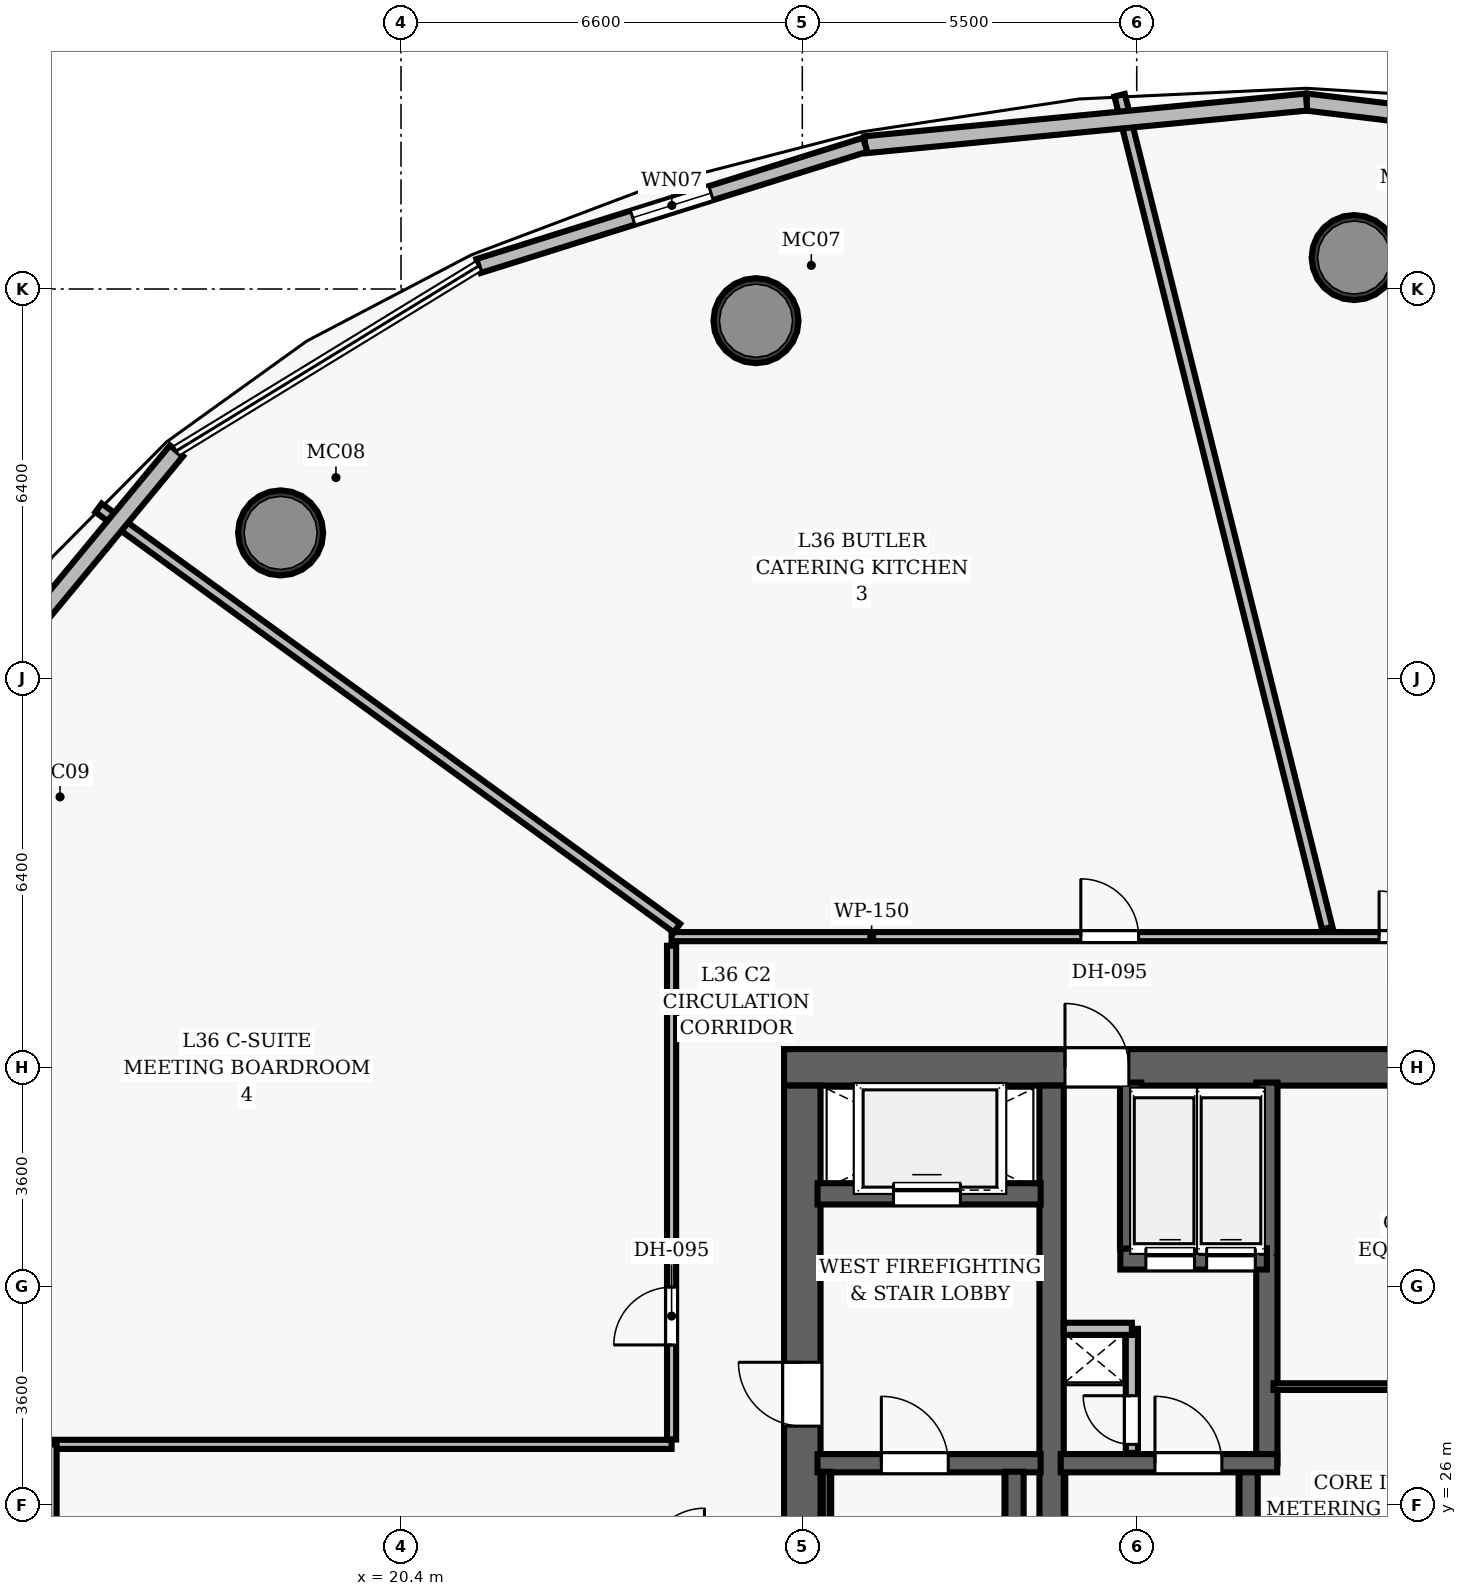
"""IFC4 building model, lengths in metres.
Left out: names, types, materials, properties, quantities, classifications, styles, units other than length and angle.
Written with IfcOpenShell. Run it as: python <this file> out.ifc"""

import sys

from ifc_helpers import new_model, si_unit, direction, frame, frame_2d, origin, origin_2d, place, context, subcontext, project, spatial, rectangle, hollow_circle, extrude, element, fill, save


model = new_model("IFC4")
c1 = context("Model", 3, precision=1e-05, world=origin(), true_north=direction((0.0, 1.0)))
c2 = subcontext(c1, "Body", "Model", "MODEL_VIEW")
j1 = project(units=[si_unit("LENGTHUNIT", "METRE"), si_unit("PLANEANGLEUNIT", "RADIAN")], contexts=[c1])
p1 = place(None, origin())
s1 = spatial("IfcSite", under=j1, at=p1, CompositionType="ELEMENT")
p2 = place(p1, origin())
s2 = spatial("IfcBuilding", under=s1, at=p2, CompositionType="ELEMENT")
p3 = place(p2, frame((0.0, 0.0, 144.8)))
s3 = spatial("IfcBuildingStorey", under=s2, at=p3, CompositionType="ELEMENT", Elevation=144.8)
p4 = place(p3, frame((26.7, 33.2, 0.0), z_axis=(0.0, 0.0, 1.0), x_axis=(1.0, 0.0, 0.0)))
e1 = element("IfcWall", 1, at=p4, inside=s3, PredefinedType="SHEAR", context=c2, shape_type="SweptSolid", body=[
    extrude(rectangle(XDim=22.6, YDim=0.6, at=frame_2d((11.3, 0.0))), origin(), (0.0, 0.0, 1.0), 3.5),
])
p5 = place(p4, frame((4.62, 0.0, 0.0)))
e2 = element("IfcOpeningElement", 2, at=p5, cuts=e1, PredefinedType="OPENING", context=c2, shape_type="SweptSolid", body=[
    extrude(rectangle(XDim=1.05, YDim=2.15, at=frame_2d((0.525, 1.075))), frame((0.0, 0.31, 0.0), z_axis=(0.0, -1.0, 0.0), x_axis=(1.0, 0.0, 0.0)), (0.0, 0.0, 1.0), 0.62),
])
p6 = place(p4, frame((14.52, 0.0, 0.0)))
e3 = element("IfcOpeningElement", 3, at=p6, cuts=e1, PredefinedType="OPENING", context=c2, shape_type="SweptSolid", body=[
    extrude(rectangle(XDim=1.05, YDim=2.15, at=frame_2d((0.525, 1.075))), frame((0.0, 0.31, 0.0), z_axis=(0.0, -1.0, 0.0), x_axis=(1.0, 0.0, 0.0)), (0.0, 0.0, 1.0), 0.62),
])
p7 = place(p3, frame((27.0, 19.1, 0.0), z_axis=(0.0, 0.0, 1.0), x_axis=(0.0, 1.0, 0.0)))
e4 = element("IfcWall", 4, at=p7, inside=s3, PredefinedType="SHEAR", context=c2, shape_type="SweptSolid", body=[
    extrude(rectangle(XDim=13.8, YDim=0.6, at=frame_2d((6.9, 0.0))), origin(), (0.0, 0.0, 1.0), 3.5),
])
p8 = place(p7, frame((8.2, 0.0, 0.0)))
e5 = element("IfcOpeningElement", 5, at=p8, cuts=e4, PredefinedType="OPENING", context=c2, shape_type="SweptSolid", body=[
    extrude(rectangle(XDim=1.05, YDim=2.15, at=frame_2d((0.525, 1.075))), frame((0.0, 0.31, 0.0), z_axis=(0.0, -1.0, 0.0), x_axis=(1.0, 0.0, 0.0)), (0.0, 0.0, 1.0), 0.62),
])
p9 = place(p3, frame((31.1, 19.1, 0.0), z_axis=(0.0, 0.0, 1.0), x_axis=(0.0, 1.0, 0.0)))
e6 = element("IfcWall", 6, at=p9, inside=s3, PredefinedType="SHEAR", context=c2, shape_type="SweptSolid", body=[
    extrude(rectangle(XDim=13.8, YDim=0.4, at=frame_2d((6.9, 0.0))), origin(), (0.0, 0.0, 1.0), 3.5),
])
for number, where, z_axis, x_axis in (
    (7, (36.076, 46.517, 0.0), (0.0, 0.0, 1.0), (1.0, 0.0, 0.0)),
    (8, (26.238, 45.479, 0.0), (0.0, 0.0, 1.0), (1.0, 0.0, 0.0)),
    (9, (18.42, 41.989, 0.0), (0.0, 0.0, 1.0), (1.0, 0.0, 0.0)),
):
    element("IfcColumn", number, at=place(p3, frame(where, z_axis=z_axis, x_axis=x_axis)), inside=s3, PredefinedType="COLUMN", context=c2, shape_type="SweptSolid", body=[
        extrude(hollow_circle(Radius=0.7, WallThickness=0.055, at=origin_2d()), origin(), (0.0, 0.0, 1.0), 3.5),
    ])
p10 = place(p3, frame((27.25, 26.69, 0.0), z_axis=(0.0, 0.0, 1.0), x_axis=(1.0, 0.0, 0.0)))
e10 = element("IfcWall", 10, at=p10, inside=s3, PredefinedType="SHEAR", context=c2, shape_type="SweptSolid", body=[
    extrude(rectangle(XDim=3.67, YDim=0.3, at=frame_2d((1.835, 0.0))), origin(), (0.0, 0.0, 1.0), 3.5),
])
p11 = place(p10, frame((1.05, 0.0, 0.0)))
e11 = element("IfcOpeningElement", 11, at=p11, cuts=e10, PredefinedType="OPENING", context=c2, shape_type="SweptSolid", body=[
    extrude(rectangle(XDim=1.1, YDim=2.15, at=frame_2d((0.55, 1.075))), frame((0.0, 0.16, 0.0), z_axis=(0.0, -1.0, 0.0), x_axis=(1.0, 0.0, 0.0)), (0.0, 0.0, 1.0), 0.32),
])
p12 = place(p3, frame((30.49, 19.05, 0.0), z_axis=(0.0, 0.0, 1.0), x_axis=(0.0, 1.0, 0.0)))
e12 = element("IfcWall", 12, at=p12, inside=s3, PredefinedType="SHEAR", context=c2, shape_type="SweptSolid", body=[
    extrude(rectangle(XDim=7.5, YDim=0.3, at=frame_2d((3.75, 0.0))), origin(), (0.0, 0.0, 1.0), 3.5),
])
p13 = place(p3, frame((27.395, 19.1, 0.0), z_axis=(0.0, 0.0, 1.0), x_axis=(0.0, 1.0, 0.0)))
e13 = element("IfcWall", 13, at=p13, inside=s3, PredefinedType="SHEAR", context=c2, shape_type="SweptSolid", body=[
    extrude(rectangle(XDim=7.45, YDim=0.12, at=frame_2d((3.725, 0.0))), origin(), (0.0, 0.0, 1.0), 3.5),
])
p14 = place(p3, frame((27.25, 31.12, 0.0), z_axis=(0.0, 0.0, 1.0), x_axis=(1.0, 0.0, 0.0)))
e14 = element("IfcWall", 14, at=p14, inside=s3, PredefinedType="SHEAR", context=c2, shape_type="SweptSolid", body=[
    extrude(rectangle(XDim=3.67, YDim=0.35, at=frame_2d((1.835, 0.0))), origin(), (0.0, 0.0, 1.0), 2.675),
])
p15 = place(p14, frame((1.25, 0.0, 0.0)))
e15 = element("IfcOpeningElement", 15, at=p15, cuts=e14, PredefinedType="OPENING", context=c2, shape_type="SweptSolid", body=[
    extrude(rectangle(XDim=1.1, YDim=2.15, at=frame_2d((0.55, 1.075))), frame((0.0, 0.185, 0.0), z_axis=(0.0, -1.0, 0.0), x_axis=(1.0, 0.0, 0.0)), (0.0, 0.0, 1.0), 0.37),
])
p16 = place(p3, frame((34.34, 19.05, 0.0), z_axis=(0.0, 0.0, 1.0), x_axis=(0.0, 1.0, 0.0)))
e16 = element("IfcWall", 16, at=p16, inside=s3, PredefinedType="SHEAR", context=c2, shape_type="SweptSolid", body=[
    extrude(rectangle(XDim=7.5, YDim=0.3, at=frame_2d((3.75, 0.0))), origin(), (0.0, 0.0, 1.0), 3.5),
])
p17 = place(p3, frame((34.64, 26.69, 0.0), z_axis=(0.0, 0.0, 1.0), x_axis=(0.0, 1.0, 0.0)))
e17 = element("IfcWall", 17, at=p17, inside=s3, PredefinedType="SHEAR", context=c2, shape_type="SweptSolid", body=[
    extrude(rectangle(XDim=6.26, YDim=0.35, at=frame_2d((3.13, 0.0))), origin(), (0.0, 0.0, 1.0), 3.5),
])
p18 = place(p3, frame((31.25, 26.69, 0.0), z_axis=(0.0, 0.0, 1.0), x_axis=(1.0, 0.0, 0.0)))
e18 = element("IfcWall", 18, at=p18, inside=s3, PredefinedType="SHEAR", context=c2, shape_type="SweptSolid", body=[
    extrude(rectangle(XDim=3.56, YDim=0.3, at=frame_2d((1.78, 0.0))), origin(), (0.0, 0.0, 1.0), 3.5),
])
p19 = place(p18, frame((1.55, 0.0, 0.0)))
e19 = element("IfcOpeningElement", 19, at=p19, cuts=e18, PredefinedType="OPENING", context=c2, shape_type="SweptSolid", body=[
    extrude(rectangle(XDim=1.1, YDim=2.15, at=frame_2d((0.55, 1.075))), frame((0.0, 0.16, 0.0), z_axis=(0.0, -1.0, 0.0), x_axis=(1.0, 0.0, 0.0)), (0.0, 0.0, 1.0), 0.32),
])
p20 = place(p3, frame((32.23, 30.05, 0.0), z_axis=(0.0, 0.0, 1.0), x_axis=(1.0, 0.0, 0.0)))
e20 = element("IfcWall", 20, at=p20, inside=s3, PredefinedType="SHEAR", context=c2, shape_type="SweptSolid", body=[
    extrude(rectangle(XDim=2.41, YDim=0.35, at=frame_2d((1.205, 0.0))), origin(), (0.0, 0.0, 1.0), 2.675),
])
p21 = place(p20, frame((0.42, 0.0, 0.0)))
e21 = element("IfcOpeningElement", 21, at=p21, cuts=e20, PredefinedType="OPENING", context=c2, shape_type="SweptSolid", body=[
    extrude(rectangle(XDim=0.8, YDim=2.15, at=frame_2d((0.4, 1.075))), frame((0.0, 0.185, 0.0), z_axis=(0.0, -1.0, 0.0), x_axis=(1.0, 0.0, 0.0)), (0.0, 0.0, 1.0), 0.37),
])
p22 = place(p20, frame((1.42, 0.0, 0.0)))
e22 = element("IfcOpeningElement", 22, at=p22, cuts=e20, PredefinedType="OPENING", context=c2, shape_type="SweptSolid", body=[
    extrude(rectangle(XDim=0.8, YDim=2.15, at=frame_2d((0.4, 1.075))), frame((0.0, 0.185, 0.0), z_axis=(0.0, -1.0, 0.0), x_axis=(1.0, 0.0, 0.0)), (0.0, 0.0, 1.0), 0.37),
])
p23 = place(p3, frame((32.4, 30.22, 0.0), z_axis=(0.0, 0.0, 1.0), x_axis=(0.0, 1.0, 0.0)))
e23 = element("IfcWall", 23, at=p23, inside=s3, PredefinedType="SHEAR", context=c2, shape_type="SweptSolid", body=[
    extrude(rectangle(XDim=2.73, YDim=0.35, at=frame_2d((1.365, 0.0))), origin(), (0.0, 0.0, 1.0), 2.675),
])
p24 = place(p3, frame((32.42, 26.86, 0.0), z_axis=(0.0, 0.0, 1.0), x_axis=(0.0, 1.0, 0.0)))
e24 = element("IfcWall", 24, at=p24, inside=s3, PredefinedType="PARTITIONING", context=c2, shape_type="SweptSolid", body=[
    extrude(rectangle(XDim=2.04, YDim=0.2, at=frame_2d((1.02, 0.0))), origin(), (0.0, 0.0, 1.0), 2.675),
])
p25 = place(p24, frame((0.14, 0.0, 0.0)))
e25 = element("IfcOpeningElement", 25, at=p25, cuts=e24, PredefinedType="OPENING", context=c2, shape_type="SweptSolid", body=[
    extrude(rectangle(XDim=0.8, YDim=2.05, at=frame_2d((0.4, 1.025))), frame((0.0, 0.11, 0.0), z_axis=(0.0, -1.0, 0.0), x_axis=(1.0, 0.0, 0.0)), (0.0, 0.0, 1.0), 0.22),
])
p26 = place(p3, frame((31.3, 28.9, 0.0), z_axis=(0.0, 0.0, 1.0), x_axis=(1.0, 0.0, 0.0)))
e26 = element("IfcWall", 26, at=p26, inside=s3, PredefinedType="PARTITIONING", context=c2, shape_type="SweptSolid", body=[
    extrude(rectangle(XDim=1.12, YDim=0.2, at=frame_2d((0.56, 0.0))), origin(), (0.0, 0.0, 1.0), 2.675),
])
p27 = place(p3, frame((34.75, 27.95, 0.0), z_axis=(0.0, 0.0, 1.0), x_axis=(1.0, 0.0, 0.0)))
e27 = element("IfcWall", 27, at=p27, inside=s3, PredefinedType="PARTITIONING", context=c2, shape_type="SweptSolid", body=[
    extrude(rectangle(XDim=6.25, YDim=0.11, at=frame_2d((3.125, 0.0))), origin(), (0.0, 0.0, 1.0), 2.675),
])
p28 = place(p3, frame((24.85, 35.35, 0.0), z_axis=(0.0, 0.0, 1.0), x_axis=(1.0, 0.0, 0.0)))
e28 = element("IfcWall", 28, at=p28, inside=s3, PredefinedType="PARTITIONING", context=c2, shape_type="SweptSolid", body=[
    extrude(rectangle(XDim=26.0, YDim=0.15, at=frame_2d((13.0, 0.0))), origin(), (0.0, 0.0, 1.0), 2.675),
])
p29 = place(p28, frame((18.854, 0.0, 0.0)))
e29 = element("IfcOpeningElement", 29, at=p29, cuts=e28, PredefinedType="OPENING", context=c2, shape_type="SweptSolid", body=[
    extrude(rectangle(XDim=1.5, YDim=2.2, at=frame_2d((0.75, 1.1))), frame((0.0, 0.085, 0.0), z_axis=(0.0, -1.0, 0.0), x_axis=(1.0, 0.0, 0.0)), (0.0, 0.0, 1.0), 0.17),
])
p30 = place(p28, frame((11.636, 0.0, 0.0)))
e30 = element("IfcOpeningElement", 30, at=p30, cuts=e28, PredefinedType="OPENING", context=c2, shape_type="SweptSolid", body=[
    extrude(rectangle(XDim=1.5, YDim=2.2, at=frame_2d((0.75, 1.1))), frame((0.0, 0.085, 0.0), z_axis=(0.0, -1.0, 0.0), x_axis=(1.0, 0.0, 0.0)), (0.0, 0.0, 1.0), 0.17),
])
p31 = place(p28, frame((6.73, 0.0, 0.0)))
e31 = element("IfcOpeningElement", 31, at=p31, cuts=e28, PredefinedType="OPENING", context=c2, shape_type="SweptSolid", body=[
    extrude(rectangle(XDim=0.95, YDim=2.15, at=frame_2d((0.475, 1.075))), frame((0.0, 0.085, 0.0), z_axis=(0.0, -1.0, 0.0), x_axis=(1.0, 0.0, 0.0)), (0.0, 0.0, 1.0), 0.17),
])
p32 = place(p3, frame((24.85, 27.08, 0.0), z_axis=(0.0, 0.0, 1.0), x_axis=(0.0, 1.0, 0.0)))
e32 = element("IfcWall", 32, at=p32, inside=s3, PredefinedType="PARTITIONING", context=c2, shape_type="SweptSolid", body=[
    extrude(rectangle(XDim=8.12, YDim=0.15, at=frame_2d((4.06, 0.0))), origin(), (0.0, 0.0, 1.0), 2.675),
])
p33 = place(p32, frame((1.555, 0.0, 0.0)))
e33 = element("IfcOpeningElement", 33, at=p33, cuts=e32, PredefinedType="OPENING", context=c2, shape_type="SweptSolid", body=[
    extrude(rectangle(XDim=0.95, YDim=2.15, at=frame_2d((0.475, 1.075))), frame((0.0, 0.085, 0.0), z_axis=(0.0, -1.0, 0.0), x_axis=(1.0, 0.0, 0.0)), (0.0, 0.0, 1.0), 0.17),
])
p34 = place(p3, frame((14.661, 27.0, 0.0), z_axis=(0.0, 0.0, 1.0), x_axis=(1.0, 0.0, 0.0)))
e34 = element("IfcWall", 34, at=p34, inside=s3, PredefinedType="PARTITIONING", context=c2, shape_type="SweptSolid", body=[
    extrude(rectangle(XDim=10.189, YDim=0.15, at=frame_2d((5.094, 0.0))), origin(), (0.0, 0.0, 1.0), 2.675),
])
p35 = place(p3, frame((14.661, 25.0, 0.0), z_axis=(0.0, 0.0, 1.0), x_axis=(0.0, 1.0, 0.0)))
e35 = element("IfcWall", 35, at=p35, inside=s3, PredefinedType="PARTITIONING", context=c2, shape_type="SweptSolid", body=[
    extrude(rectangle(XDim=2.0, YDim=0.15, at=frame_2d((1.0, 0.0))), origin(), (0.0, 0.0, 1.0), 2.675),
])
p36 = place(p3, frame((35.634, 35.49, 0.0), z_axis=(0.0, 0.0, 1.0), x_axis=(-0.241921098667, 0.970295924973, 0.0)))
e36 = element("IfcWall", 36, at=p36, inside=s3, PredefinedType="PARTITIONING", context=c2, shape_type="SweptSolid", body=[
    extrude(rectangle(XDim=14.116, YDim=0.175, at=frame_2d((7.058, 0.0))), origin(), (0.0, 0.0, 1.0), 2.675),
])
p37 = place(p3, frame((24.938, 35.49, 0.0), z_axis=(0.0, 0.0, 1.0), x_axis=(-0.809012550845, 0.587791368239, 0.0)))
e37 = element("IfcWall", 37, at=p37, inside=s3, PredefinedType="PARTITIONING", context=c2, shape_type="SweptSolid", body=[
    extrude(rectangle(XDim=11.758, YDim=0.175, at=frame_2d((5.879, 0.0))), origin(), (0.0, 0.0, 1.0), 2.675),
])
p38 = place(p3, frame((35.292, 49.074, 0.0), z_axis=(0.0, 0.0, 1.0), x_axis=(0.992756065718, -0.120147384411, 0.0)))
e38 = element("IfcWall", 38, at=p38, inside=s3, PredefinedType="SOLIDWALL", context=c2, shape_type="SweptSolid", body=[
    extrude(rectangle(XDim=7.569, YDim=0.28, at=frame_2d((3.785, 0.0))), origin(), (0.0, 0.0, 1.0), 3.26),
])
p39 = place(p3, frame((28.034, 48.372, 0.0), z_axis=(0.0, 0.0, 1.0), x_axis=(0.995352912577, 0.096294233604, 0.0)))
e39 = element("IfcWall", 39, at=p39, inside=s3, PredefinedType="SOLIDWALL", context=c2, shape_type="SweptSolid", body=[
    extrude(rectangle(XDim=7.292, YDim=0.28, at=frame_2d((3.646, 0.0))), origin(), (0.0, 0.0, 1.0), 3.26),
])
p40 = place(p3, frame((21.674, 46.378, 0.0), z_axis=(0.0, 0.0, 1.0), x_axis=(0.954173150703, 0.299255072601, 0.0)))
e40 = element("IfcWall", 40, at=p40, inside=s3, PredefinedType="SOLIDWALL", context=c2, shape_type="SweptSolid", body=[
    extrude(rectangle(XDim=6.665, YDim=0.24, at=frame_2d((3.333, 0.0))), origin(), (0.0, 0.0, 1.0), 3.26),
])
p41 = place(p40, frame((2.658, 0.0, 0.85)))
e41 = element("IfcOpeningElement", 41, at=p41, cuts=e40, PredefinedType="OPENING", context=c2, shape_type="SweptSolid", body=[
    extrude(rectangle(XDim=1.35, YDim=1.65, at=frame_2d((0.675, 0.825))), frame((0.0, 0.13, 0.0), z_axis=(0.0, -1.0, 0.0), x_axis=(1.0, 0.0, 0.0)), (0.0, 0.0, 1.0), 0.26),
])
p42 = place(p3, frame((13.411, 39.351, 0.0), z_axis=(0.0, 0.0, 1.0), x_axis=(0.63713502478, 0.770752204148, 0.0)))
e42 = element("IfcWall", 42, at=p42, inside=s3, PredefinedType="SOLIDWALL", context=c2, shape_type="SweptSolid", body=[
    extrude(rectangle(XDim=5.175, YDim=0.28, at=frame_2d((2.587, 0.0))), origin(), (0.0, 0.0, 1.0), 3.26),
])
p43 = place(p11, origin())
e43 = element("IfcDoor", 43, at=p43, inside=s3, OperationType="SINGLE_SWING_LEFT", PredefinedType="DOOR", context=c2, shape_type="SweptSolid", body=[
    extrude(rectangle(XDim=1.1, YDim=2.15, at=frame_2d((0.55, 1.075))), frame((0.0, 0.025, 0.0), z_axis=(0.0, -1.0, 0.0), x_axis=(1.0, 0.0, 0.0)), (0.0, 0.0, 1.0), 0.05),
])
fill(e11, e43)
p44 = place(p8, origin())
e44 = element("IfcDoor", 44, at=p44, inside=s3, OperationType="SINGLE_SWING_RIGHT", PredefinedType="DOOR", context=c2, shape_type="SweptSolid", body=[
    extrude(rectangle(XDim=1.05, YDim=2.15, at=frame_2d((0.525, 1.075))), frame((0.0, 0.025, 0.0), z_axis=(0.0, -1.0, 0.0), x_axis=(1.0, 0.0, 0.0)), (0.0, 0.0, 1.0), 0.05),
])
fill(e5, e44)
p45 = place(p19, origin())
e45 = element("IfcDoor", 45, at=p45, inside=s3, OperationType="SINGLE_SWING_LEFT", PredefinedType="DOOR", context=c2, shape_type="SweptSolid", body=[
    extrude(rectangle(XDim=1.1, YDim=2.15, at=frame_2d((0.55, 1.075))), frame((0.0, 0.025, 0.0), z_axis=(0.0, -1.0, 0.0), x_axis=(1.0, 0.0, 0.0)), (0.0, 0.0, 1.0), 0.05),
])
fill(e19, e45)
p46 = place(p25, origin())
e46 = element("IfcDoor", 46, at=p46, inside=s3, OperationType="SINGLE_SWING_RIGHT", PredefinedType="DOOR", context=c2, shape_type="SweptSolid", body=[
    extrude(rectangle(XDim=0.8, YDim=2.05, at=frame_2d((0.4, 1.025))), frame((0.0, 0.025, 0.0), z_axis=(0.0, -1.0, 0.0), x_axis=(1.0, 0.0, 0.0)), (0.0, 0.0, 1.0), 0.05),
])
fill(e25, e46)
p47 = place(p5, origin())
e47 = element("IfcDoor", 47, at=p47, inside=s3, OperationType="SINGLE_SWING_LEFT", PredefinedType="DOOR", context=c2, shape_type="SweptSolid", body=[
    extrude(rectangle(XDim=1.05, YDim=2.15, at=frame_2d((0.525, 1.075))), frame((0.0, 0.025, 0.0), z_axis=(0.0, -1.0, 0.0), x_axis=(1.0, 0.0, 0.0)), (0.0, 0.0, 1.0), 0.05),
])
fill(e2, e47)
p48 = place(p30, origin())
e48 = element("IfcDoor", 48, at=p48, inside=s3, OperationType="DOUBLE_DOOR_SINGLE_SWING", PredefinedType="DOOR", context=c2, shape_type="SweptSolid", body=[
    extrude(rectangle(XDim=1.5, YDim=2.2, at=frame_2d((0.75, 1.1))), frame((0.0, 0.025, 0.0), z_axis=(0.0, -1.0, 0.0), x_axis=(1.0, 0.0, 0.0)), (0.0, 0.0, 1.0), 0.05),
])
fill(e30, e48)
p49 = place(p31, origin())
e49 = element("IfcDoor", 49, at=p49, inside=s3, OperationType="SINGLE_SWING_LEFT", PredefinedType="DOOR", context=c2, shape_type="SweptSolid", body=[
    extrude(rectangle(XDim=0.95, YDim=2.15, at=frame_2d((0.475, 1.075))), frame((0.0, 0.025, 0.0), z_axis=(0.0, -1.0, 0.0), x_axis=(1.0, 0.0, 0.0)), (0.0, 0.0, 1.0), 0.05),
])
fill(e31, e49)
p50 = place(p33, origin())
e50 = element("IfcDoor", 50, at=p50, inside=s3, OperationType="SINGLE_SWING_LEFT", PredefinedType="DOOR", context=c2, shape_type="SweptSolid", body=[
    extrude(rectangle(XDim=0.95, YDim=2.15, at=frame_2d((0.475, 1.075))), frame((0.0, 0.025, 0.0), z_axis=(0.0, -1.0, 0.0), x_axis=(1.0, 0.0, 0.0)), (0.0, 0.0, 1.0), 0.05),
])
fill(e33, e50)
p51 = place(p15, origin())
e51 = element("IfcDoor", 51, at=p51, inside=s3, OperationType="SLIDING_TO_LEFT", PredefinedType="DOOR", context=c2, shape_type="SweptSolid", body=[
    extrude(rectangle(XDim=1.1, YDim=2.15, at=frame_2d((0.55, 1.075))), frame((0.0, 0.025, 0.0), z_axis=(0.0, -1.0, 0.0), x_axis=(1.0, 0.0, 0.0)), (0.0, 0.0, 1.0), 0.05),
])
fill(e15, e51)
p52 = place(p21, origin())
e52 = element("IfcDoor", 52, at=p52, inside=s3, OperationType="SLIDING_TO_LEFT", PredefinedType="DOOR", context=c2, shape_type="SweptSolid", body=[
    extrude(rectangle(XDim=0.8, YDim=2.15, at=frame_2d((0.4, 1.075))), frame((0.0, 0.025, 0.0), z_axis=(0.0, -1.0, 0.0), x_axis=(1.0, 0.0, 0.0)), (0.0, 0.0, 1.0), 0.05),
])
fill(e21, e52)
p53 = place(p22, origin())
e53 = element("IfcDoor", 53, at=p53, inside=s3, OperationType="SLIDING_TO_LEFT", PredefinedType="DOOR", context=c2, shape_type="SweptSolid", body=[
    extrude(rectangle(XDim=0.8, YDim=2.15, at=frame_2d((0.4, 1.075))), frame((0.0, 0.025, 0.0), z_axis=(0.0, -1.0, 0.0), x_axis=(1.0, 0.0, 0.0)), (0.0, 0.0, 1.0), 0.05),
])
fill(e22, e53)
p54 = place(p41, origin())
e54 = element("IfcWindow", 54, at=p54, inside=s3, PartitioningType="SINGLE_PANEL", PredefinedType="WINDOW", context=c2, shape_type="SweptSolid", body=[
    extrude(rectangle(XDim=1.35, YDim=1.65, at=frame_2d((0.675, 0.825))), frame((0.0, 0.03, 0.0), z_axis=(0.0, -1.0, 0.0), x_axis=(1.0, 0.0, 0.0)), (0.0, 0.0, 1.0), 0.06),
])
fill(e41, e54)
save(model, sys.argv[1])
